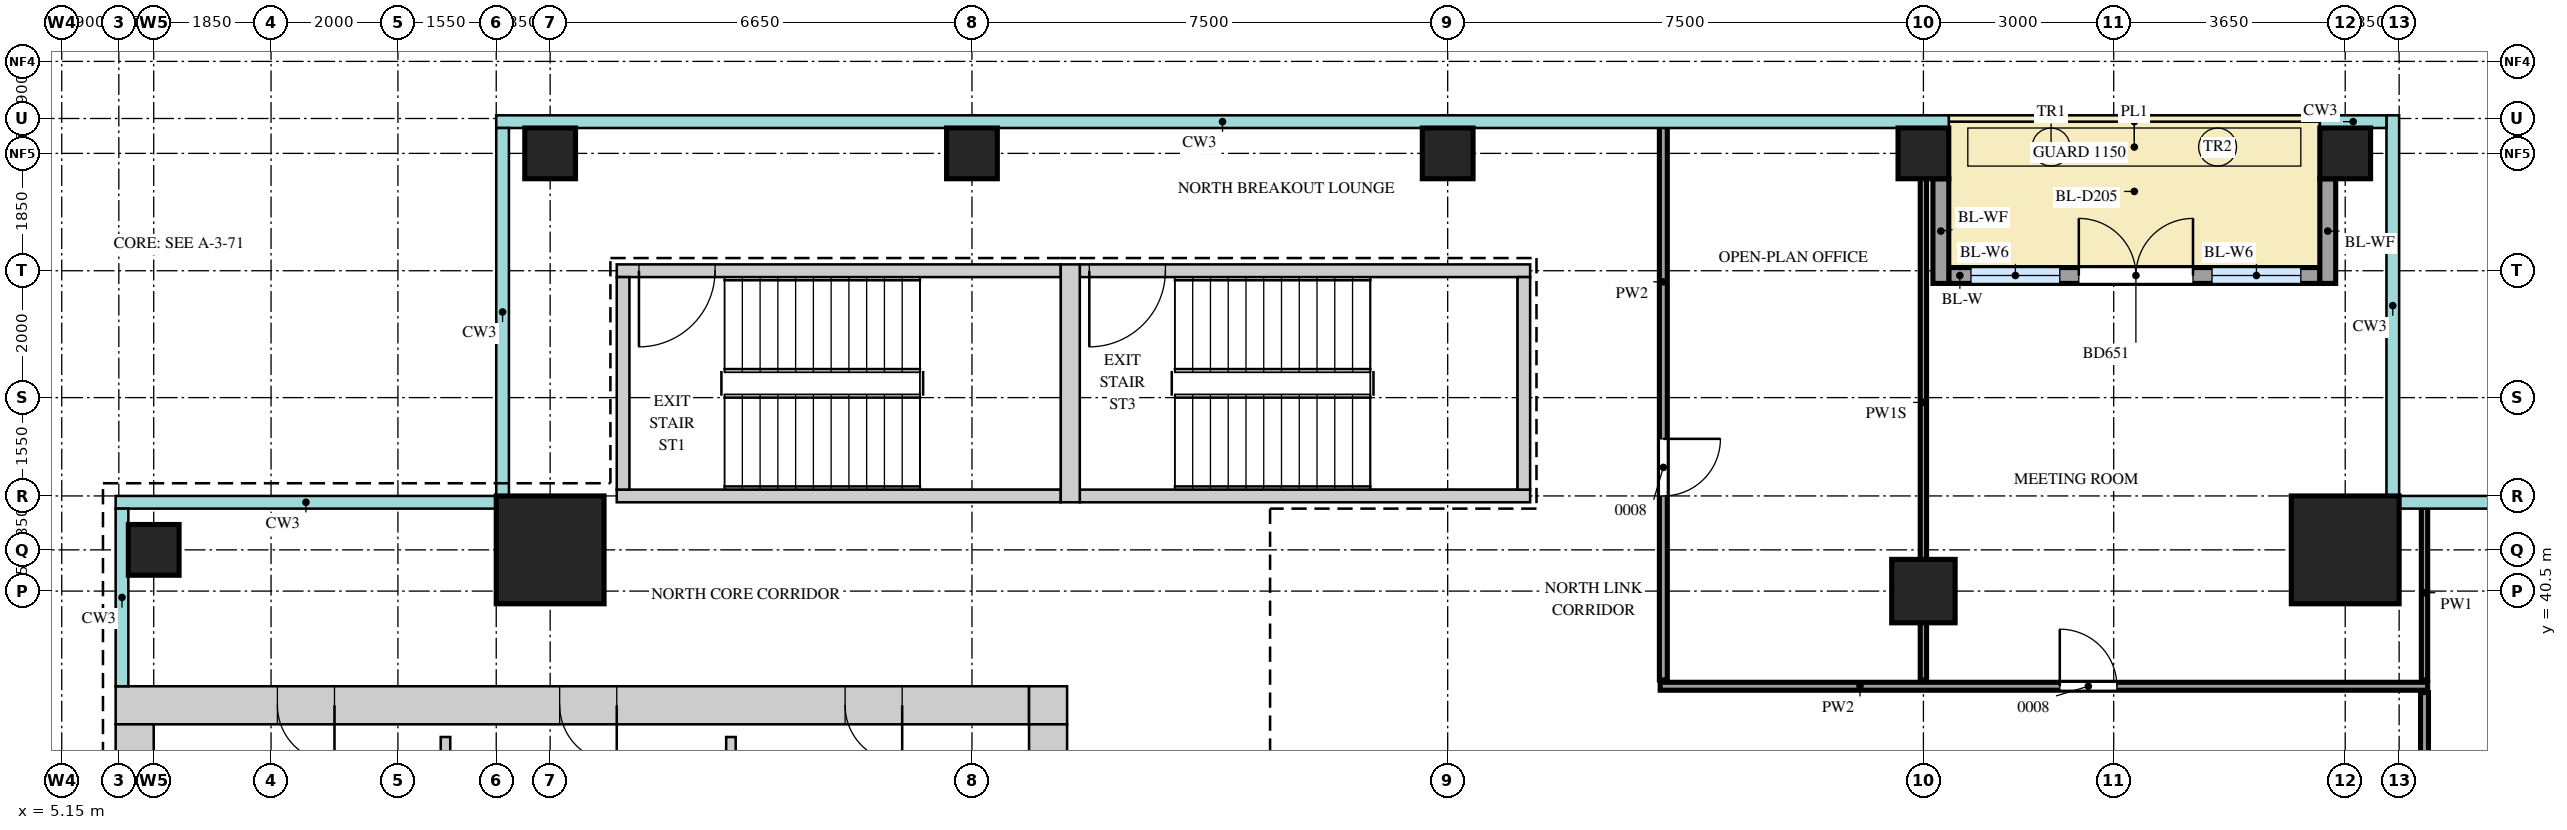
"""IFC4 building model, lengths in metres.
Left out: names, types, materials, properties, quantities, classifications, styles, units other than length and angle.
Written with IfcOpenShell. Run it as: python <this file> out.ifc"""

import sys

from ifc_helpers import new_model, si_unit, direction, frame, frame_2d, origin, origin_2d, place, context, subcontext, project, spatial, rectangle, extrude, source, transform, mapped, element, fill, save


model = new_model("IFC4")
c1 = context("Model", 3, precision=1e-05, world=origin(), true_north=direction((0.0, 1.0)))
c2 = subcontext(c1, "Body", "Model", "MODEL_VIEW")
j1 = project(units=[si_unit("LENGTHUNIT", "METRE"), si_unit("PLANEANGLEUNIT", "RADIAN")], contexts=[c1])
p1 = place(None, origin())
s1 = spatial("IfcSite", under=j1, at=p1, CompositionType="ELEMENT")
p2 = place(p1, origin())
s2 = spatial("IfcBuilding", under=s1, at=p2, CompositionType="ELEMENT")
p3 = place(p2, frame((0.0, 0.0, 290.2)))
s3 = spatial("IfcBuildingStorey", under=s2, at=p3, CompositionType="ELEMENT", Elevation=290.2)
m1 = source(origin(), c2, "Body", "SweptSolid", [
    extrude(rectangle(XDim=14.4, YDim=0.6, at=frame_2d((7.2, 0.0))), origin(), (0.0, 0.0, 1.0), 3.75),
])
p4 = place(p3, frame((6.0, 38.7, 0.0), z_axis=(0.0, 0.0, 1.0), x_axis=(1.0, 0.0, 0.0)))
e1 = element("IfcWall", 1, at=p4, inside=s3, PredefinedType="SHEAR", context=c2, shape_type="MappedRepresentation", body=[
    mapped(m1, transform((0.0, 0.0, 0.0))),
])
m2 = source(origin(), c2, "Body", "SweptSolid", [
    extrude(rectangle(XDim=0.9, YDim=2.1, at=frame_2d((0.45, 1.05))), frame((0.0, 0.31, 0.0), z_axis=(0.0, -1.0, 0.0), x_axis=(1.0, 0.0, 0.0)), (0.0, 0.0, 1.0), 0.62),
])
p5 = place(p4, frame((2.55, 0.0, 0.0)))
e2 = element("IfcOpeningElement", 2, at=p5, cuts=e1, PredefinedType="OPENING", context=c2, shape_type="MappedRepresentation", body=[
    mapped(m2, transform((0.0, 0.0, 0.0))),
])
p6 = place(p4, frame((7.0, 0.0, 0.0)))
e3 = element("IfcOpeningElement", 3, at=p6, cuts=e1, PredefinedType="OPENING", context=c2, shape_type="MappedRepresentation", body=[
    mapped(m2, transform((0.0, 0.0, 0.0))),
])
p7 = place(p4, frame((11.5, 0.0, 0.0)))
e4 = element("IfcOpeningElement", 4, at=p7, cuts=e1, PredefinedType="OPENING", context=c2, shape_type="MappedRepresentation", body=[
    mapped(m2, transform((0.0, 0.0, 0.0))),
])
m3 = source(origin(), c2, "Body", "SweptSolid", [
    extrude(rectangle(XDim=0.6, YDim=0.6, at=frame_2d((0.3, 0.0))), origin(), (0.0, 0.0, 1.0), 3.75),
])
p8 = place(p3, frame((20.4, 38.7, 0.0), z_axis=(0.0, 0.0, 1.0), x_axis=(1.0, 0.0, 0.0)))
e5 = element("IfcWall", 5, at=p8, inside=s3, PredefinedType="SHEAR", context=c2, shape_type="MappedRepresentation", body=[
    mapped(m3, transform((0.0, 0.0, 0.0))),
])
m4 = source(origin(), c2, "Body", "SweptSolid", [
    extrude(rectangle(XDim=22.8, YDim=0.6, at=frame_2d((11.4, 0.0))), origin(), (0.0, 0.0, 1.0), 3.75),
])
p9 = place(p3, frame((20.7, 15.6, 0.0), z_axis=(0.0, 0.0, 1.0), x_axis=(0.0, 1.0, 0.0)))
e6 = element("IfcWall", 6, at=p9, inside=s3, PredefinedType="SHEAR", context=c2, shape_type="MappedRepresentation", body=[
    mapped(m4, transform((0.0, 0.0, 0.0))),
])
m5 = source(origin(), c2, "Body", "SweptSolid", [
    extrude(rectangle(XDim=1.8, YDim=2.1, at=frame_2d((0.9, 1.05))), frame((0.0, 0.31, 0.0), z_axis=(0.0, -1.0, 0.0), x_axis=(1.0, 0.0, 0.0)), (0.0, 0.0, 1.0), 0.62),
])
p10 = place(p9, frame((10.9, 0.0, 0.0)))
e7 = element("IfcOpeningElement", 7, at=p10, cuts=e6, PredefinedType="OPENING", context=c2, shape_type="MappedRepresentation", body=[
    mapped(m5, transform((0.0, 0.0, 0.0))),
])
p11 = place(p9, frame((0.55, 0.0, 0.0)))
e8 = element("IfcOpeningElement", 8, at=p11, cuts=e6, PredefinedType="OPENING", context=c2, shape_type="MappedRepresentation", body=[
    mapped(m2, transform((0.0, 0.0, 0.0))),
])
m6 = source(origin(), c2, "Body", "SweptSolid", [
    extrude(rectangle(XDim=1.0, YDim=2.1, at=frame_2d((0.5, 1.05))), frame((0.0, 0.31, 0.0), z_axis=(0.0, -1.0, 0.0), x_axis=(1.0, 0.0, 0.0)), (0.0, 0.0, 1.0), 0.62),
])
p12 = place(p9, frame((2.3, 0.0, 0.0)))
e9 = element("IfcOpeningElement", 9, at=p12, cuts=e6, PredefinedType="OPENING", context=c2, shape_type="MappedRepresentation", body=[
    mapped(m6, transform((0.0, 0.0, 0.0))),
])
p13 = place(p9, frame((5.1, 0.0, 0.0)))
e10 = element("IfcOpeningElement", 10, at=p13, cuts=e6, PredefinedType="OPENING", context=c2, shape_type="MappedRepresentation", body=[
    mapped(m2, transform((0.0, 0.0, 0.0))),
])
p14 = place(p3, frame((6.3, 15.6, 0.0), z_axis=(0.0, 0.0, 1.0), x_axis=(0.0, 1.0, 0.0)))
e11 = element("IfcWall", 11, at=p14, inside=s3, PredefinedType="SHEAR", context=c2, shape_type="MappedRepresentation", body=[
    mapped(m4, transform((0.0, 0.0, 0.0))),
])
m7 = source(origin(), c2, "Body", "SweptSolid", [
    extrude(rectangle(XDim=7.0, YDim=0.2, at=frame_2d((3.5, 0.0))), origin(), (0.0, 0.0, 1.0), 3.75),
])
p15 = place(p3, frame((13.9, 45.55, 0.0), z_axis=(0.0, 0.0, 1.0), x_axis=(1.0, 0.0, 0.0)))
e12 = element("IfcWall", 12, at=p15, inside=s3, PredefinedType="SHEAR", context=c2, shape_type="MappedRepresentation", body=[
    mapped(m7, transform((0.0, 0.0, 0.0))),
])
m8 = source(origin(), c2, "Body", "SweptSolid", [
    extrude(rectangle(XDim=1.2, YDim=2.1, at=frame_2d((0.6, 1.05))), frame((0.0, 0.11, 0.0), z_axis=(0.0, -1.0, 0.0), x_axis=(1.0, 0.0, 0.0)), (0.0, 0.0, 1.0), 0.22),
])
p16 = place(p15, frame((0.35, 0.0, 0.0)))
e13 = element("IfcOpeningElement", 13, at=p16, cuts=e12, PredefinedType="OPENING", context=c2, shape_type="MappedRepresentation", body=[
    mapped(m8, transform((0.0, 0.0, 0.0))),
])
p17 = place(p3, frame((13.9, 42.0, 0.0), z_axis=(0.0, 0.0, 1.0), x_axis=(1.0, 0.0, 0.0)))
e14 = element("IfcWall", 14, at=p17, inside=s3, PredefinedType="SHEAR", context=c2, shape_type="MappedRepresentation", body=[
    mapped(m7, transform((0.0, 0.0, 0.0))),
])
m9 = source(origin(), c2, "Body", "SweptSolid", [
    extrude(rectangle(XDim=7.1, YDim=0.2, at=frame_2d((3.55, 0.0))), origin(), (0.0, 0.0, 1.0), 3.75),
])
p18 = place(p3, frame((21.2, 45.55, 0.0), z_axis=(0.0, 0.0, 1.0), x_axis=(1.0, 0.0, 0.0)))
e15 = element("IfcWall", 15, at=p18, inside=s3, PredefinedType="SHEAR", context=c2, shape_type="MappedRepresentation", body=[
    mapped(m9, transform((0.0, 0.0, 0.0))),
])
p19 = place(p18, frame((0.15, 0.0, 0.0)))
e16 = element("IfcOpeningElement", 16, at=p19, cuts=e15, PredefinedType="OPENING", context=c2, shape_type="MappedRepresentation", body=[
    mapped(m8, transform((0.0, 0.0, 0.0))),
])
p20 = place(p3, frame((21.2, 42.0, 0.0), z_axis=(0.0, 0.0, 1.0), x_axis=(1.0, 0.0, 0.0)))
e17 = element("IfcWall", 17, at=p20, inside=s3, PredefinedType="SHEAR", context=c2, shape_type="MappedRepresentation", body=[
    mapped(m9, transform((0.0, 0.0, 0.0))),
])
m10 = source(origin(), c2, "Body", "SweptSolid", [
    extrude(rectangle(XDim=3.75, YDim=0.3, at=frame_2d((1.875, 0.0))), origin(), (0.0, 0.0, 1.0), 3.75),
])
p21 = place(p3, frame((21.05, 41.9, 0.0), z_axis=(0.0, 0.0, 1.0), x_axis=(0.0, 1.0, 0.0)))
e18 = element("IfcWall", 18, at=p21, inside=s3, PredefinedType="SHEAR", context=c2, shape_type="MappedRepresentation", body=[
    mapped(m10, transform((0.0, 0.0, 0.0))),
])
m11 = source(origin(), c2, "Body", "SweptSolid", [
    extrude(rectangle(XDim=3.35, YDim=0.2, at=frame_2d((1.675, 0.0))), origin(), (0.0, 0.0, 1.0), 3.75),
])
for number, where, z_axis, x_axis in (
    (19, (14.0, 42.1, 0.0), (0.0, 0.0, 1.0), (0.0, 1.0, 0.0)),
    (20, (28.2, 42.1, 0.0), (0.0, 0.0, 1.0), (0.0, 1.0, 0.0)),
):
    element("IfcWall", number, at=place(p3, frame(where, z_axis=z_axis, x_axis=x_axis)), inside=s3, PredefinedType="SHEAR", context=c2, shape_type="MappedRepresentation", body=[
        mapped(m11, transform((0.0, 0.0, 0.0))),
    ])
m12 = source(origin(), c2, "Body", "SweptSolid", [
    extrude(rectangle(XDim=1.7, YDim=1.7, at=origin_2d()), origin(), (0.0, 0.0, 1.0), 3.75),
])
for number, where, z_axis, x_axis in (
    (21, (41.15, 41.15, 0.0), (0.0, 0.0, 1.0), (1.0, 0.0, 0.0)),
    (22, (12.85, 41.15, 0.0), (0.0, 0.0, 1.0), (1.0, 0.0, 0.0)),
):
    element("IfcColumn", number, at=place(p3, frame(where, z_axis=z_axis, x_axis=x_axis)), inside=s3, PredefinedType="COLUMN", context=c2, shape_type="MappedRepresentation", body=[
        mapped(m12, transform((0.0, 0.0, 0.0))),
    ])
m13 = source(origin(), c2, "Body", "SweptSolid", [
    extrude(rectangle(XDim=0.8, YDim=0.8, at=origin_2d()), origin(), (0.0, 0.0, 1.0), 3.75),
])
for number, where, z_axis, x_axis in (
    (23, (12.85, 47.4, 0.0), (0.0, 0.0, 1.0), (1.0, 0.0, 0.0)),
    (24, (19.5, 47.4, 0.0), (0.0, 0.0, 1.0), (1.0, 0.0, 0.0)),
    (25, (27.0, 47.4, 0.0), (0.0, 0.0, 1.0), (1.0, 0.0, 0.0)),
    (26, (34.5, 47.4, 0.0), (0.0, 0.0, 1.0), (1.0, 0.0, 0.0)),
    (27, (41.15, 47.4, 0.0), (0.0, 0.0, 1.0), (1.0, 0.0, 0.0)),
    (28, (6.6, 41.15, 0.0), (0.0, 0.0, 1.0), (1.0, 0.0, 0.0)),
):
    element("IfcColumn", number, at=place(p3, frame(where, z_axis=z_axis, x_axis=x_axis)), inside=s3, PredefinedType="COLUMN", context=c2, shape_type="MappedRepresentation", body=[
        mapped(m13, transform((0.0, 0.0, 0.0))),
    ])
m14 = source(origin(), c2, "Body", "SweptSolid", [
    extrude(rectangle(XDim=1.0, YDim=1.0, at=origin_2d()), origin(), (0.0, 0.0, 1.0), 3.75),
])
p22 = place(p3, frame((34.5, 40.5, 0.0), z_axis=(0.0, 0.0, 1.0), x_axis=(1.0, 0.0, 0.0)))
e29 = element("IfcColumn", 29, at=p22, inside=s3, PredefinedType="COLUMN", context=c2, shape_type="MappedRepresentation", body=[
    mapped(m14, transform((0.0, 0.0, 0.0))),
])
m15 = source(origin(), c2, "Body", "SweptSolid", [
    extrude(rectangle(XDim=5.85, YDim=0.25, at=frame_2d((2.925, 0.0))), origin(), (0.0, 0.0, 1.0), 3.75),
])
p23 = place(p3, frame((34.9, 45.475, 0.0), z_axis=(0.0, 0.0, 1.0), x_axis=(1.0, 0.0, 0.0)))
e30 = element("IfcWall", 30, at=p23, inside=s3, PredefinedType="SOLIDWALL", context=c2, shape_type="MappedRepresentation", body=[
    mapped(m15, transform((0.0, 0.0, 0.0))),
])
m16 = source(origin(), c2, "Body", "SweptSolid", [
    extrude(rectangle(XDim=1.4, YDim=2.4, at=frame_2d((0.7, 1.2))), frame((0.0, 0.135, 0.0), z_axis=(0.0, -1.0, 0.0), x_axis=(1.0, 0.0, 0.0)), (0.0, 0.0, 1.0), 0.27),
])
p24 = place(p23, frame((0.35, 0.0, 0.0)))
e31 = element("IfcOpeningElement", 31, at=p24, cuts=e30, PredefinedType="OPENING", context=c2, shape_type="MappedRepresentation", body=[
    mapped(m16, transform((0.0, 0.0, 0.0))),
])
p25 = place(p23, frame((4.15, 0.0, 0.0)))
e32 = element("IfcOpeningElement", 32, at=p25, cuts=e30, PredefinedType="OPENING", context=c2, shape_type="MappedRepresentation", body=[
    mapped(m16, transform((0.0, 0.0, 0.0))),
])
m17 = source(origin(), c2, "Body", "SweptSolid", [
    extrude(rectangle(XDim=1.8, YDim=2.4, at=frame_2d((0.9, 1.2))), frame((0.0, 0.135, 0.0), z_axis=(0.0, -1.0, 0.0), x_axis=(1.0, 0.0, 0.0)), (0.0, 0.0, 1.0), 0.27),
])
p26 = place(p23, frame((2.05, 0.0, 0.0)))
e33 = element("IfcOpeningElement", 33, at=p26, cuts=e30, PredefinedType="OPENING", context=c2, shape_type="MappedRepresentation", body=[
    mapped(m17, transform((0.0, 0.0, 0.0))),
])
m18 = source(origin(), c2, "Body", "SweptSolid", [
    extrude(rectangle(XDim=1.65, YDim=0.25, at=frame_2d((0.825, 0.0))), origin(), (0.0, 0.0, 1.0), 3.45),
])
for number, where, z_axis, x_axis in (
    (34, (34.775, 47.0, 0.0), (0.0, 0.0, 1.0), (0.0, -1.0, 0.0)),
    (35, (40.875, 47.0, 0.0), (0.0, 0.0, 1.0), (0.0, -1.0, 0.0)),
):
    element("IfcWall", number, at=place(p3, frame(where, z_axis=z_axis, x_axis=x_axis)), inside=s3, PredefinedType="SOLIDWALL", context=c2, shape_type="MappedRepresentation", body=[
        mapped(m18, transform((0.0, 0.0, 0.0))),
    ])
m19 = source(origin(), c2, "Body", "SweptSolid", [
    extrude(rectangle(XDim=23.8, YDim=0.125, at=frame_2d((11.9, 0.0))), origin(), (0.0, 0.0, 1.0), 3.8),
])
p27 = place(p3, frame((42.4, 15.1, 0.0), z_axis=(0.0, 0.0, 1.0), x_axis=(0.0, 1.0, 0.0)))
e36 = element("IfcWall", 36, at=p27, inside=s3, PredefinedType="PARTITIONING", context=c2, shape_type="MappedRepresentation", body=[
    mapped(m19, transform((0.0, 0.0, 0.0))),
])
m20 = source(origin(), c2, "Body", "SweptSolid", [
    extrude(rectangle(XDim=0.9, YDim=2.1, at=frame_2d((0.45, 1.05))), frame((0.0, 0.073, 0.0), z_axis=(0.0, -1.0, 0.0), x_axis=(1.0, 0.0, 0.0)), (0.0, 0.0, 1.0), 0.145),
])
p28 = place(p27, frame((5.3, 0.0, 0.0)))
e37 = element("IfcOpeningElement", 37, at=p28, cuts=e36, PredefinedType="OPENING", context=c2, shape_type="MappedRepresentation", body=[
    mapped(m20, transform((0.0, 0.0, 0.0))),
])
p29 = place(p27, frame((15.35, 0.0, 0.0)))
e38 = element("IfcOpeningElement", 38, at=p29, cuts=e36, PredefinedType="OPENING", context=c2, shape_type="MappedRepresentation", body=[
    mapped(m20, transform((0.0, 0.0, 0.0))),
])
p30 = place(p27, frame((21.05, 0.0, 0.0)))
e39 = element("IfcOpeningElement", 39, at=p30, cuts=e36, PredefinedType="OPENING", context=c2, shape_type="MappedRepresentation", body=[
    mapped(m20, transform((0.0, 0.0, 0.0))),
])
m21 = source(origin(), c2, "Body", "SweptSolid", [
    extrude(rectangle(XDim=6.0, YDim=0.15, at=frame_2d((3.0, 0.0))), origin(), (0.0, 0.0, 1.0), 3.8),
])
p31 = place(p3, frame((11.2, 32.2, 0.0), z_axis=(0.0, 0.0, 1.0), x_axis=(0.0, 1.0, 0.0)))
e40 = element("IfcWall", 40, at=p31, inside=s3, PredefinedType="PARTITIONING", context=c2, shape_type="MappedRepresentation", body=[
    mapped(m21, transform((0.0, 0.0, 0.0))),
])
m22 = source(origin(), c2, "Body", "SweptSolid", [
    extrude(rectangle(XDim=5.9, YDim=0.15, at=frame_2d((2.95, 0.0))), origin(), (0.0, 0.0, 1.0), 3.8),
])
p32 = place(p3, frame((15.7, 32.3, 0.0), z_axis=(0.0, 0.0, 1.0), x_axis=(0.0, 1.0, 0.0)))
e41 = element("IfcWall", 41, at=p32, inside=s3, PredefinedType="PARTITIONING", context=c2, shape_type="MappedRepresentation", body=[
    mapped(m22, transform((0.0, 0.0, 0.0))),
])
m23 = source(origin(), c2, "Body", "SweptSolid", [
    extrude(rectangle(XDim=12.1, YDim=0.125, at=frame_2d((6.05, 0.0))), origin(), (0.0, 0.0, 1.0), 3.8),
])
p33 = place(p3, frame((30.35, 39.0, 0.0), z_axis=(0.0, 0.0, 1.0), x_axis=(1.0, 0.0, 0.0)))
e42 = element("IfcWall", 42, at=p33, inside=s3, PredefinedType="PARTITIONING", context=c2, shape_type="MappedRepresentation", body=[
    mapped(m23, transform((0.0, 0.0, 0.0))),
])
p34 = place(p33, frame((6.3, 0.0, 0.0)))
e43 = element("IfcOpeningElement", 43, at=p34, cuts=e42, PredefinedType="OPENING", context=c2, shape_type="MappedRepresentation", body=[
    mapped(m20, transform((0.0, 0.0, 0.0))),
])
m24 = source(origin(), c2, "Body", "SweptSolid", [
    extrude(rectangle(XDim=8.75, YDim=0.125, at=frame_2d((4.375, 0.0))), origin(), (0.0, 0.0, 1.0), 3.8),
])
p35 = place(p3, frame((30.4, 39.1, 0.0), z_axis=(0.0, 0.0, 1.0), x_axis=(0.0, 1.0, 0.0)))
e44 = element("IfcWall", 44, at=p35, inside=s3, PredefinedType="PARTITIONING", context=c2, shape_type="MappedRepresentation", body=[
    mapped(m24, transform((0.0, 0.0, 0.0))),
])
p36 = place(p35, frame((2.9, 0.0, 0.0)))
e45 = element("IfcOpeningElement", 45, at=p36, cuts=e44, PredefinedType="OPENING", context=c2, shape_type="MappedRepresentation", body=[
    mapped(m20, transform((0.0, 0.0, 0.0))),
])
m25 = source(origin(), c2, "Body", "SweptSolid", [
    extrude(rectangle(XDim=8.75, YDim=0.1, at=frame_2d((4.375, 0.0))), origin(), (0.0, 0.0, 1.0), 3.35),
])
p37 = place(p3, frame((34.5, 39.1, 0.0), z_axis=(0.0, 0.0, 1.0), x_axis=(0.0, 1.0, 0.0)))
e46 = element("IfcWall", 46, at=p37, inside=s3, PredefinedType="PARTITIONING", context=c2, shape_type="MappedRepresentation", body=[
    mapped(m25, transform((0.0, 0.0, 0.0))),
])
m26 = source(origin(), c2, "Body", "SweptSolid", [
    extrude(rectangle(XDim=2.75, YDim=0.1, at=frame_2d((1.375, 0.0))), origin(), (0.0, 0.0, 1.0), 3.8),
])
p38 = place(p3, frame((42.4, 39.1, 0.0), z_axis=(0.0, 0.0, 1.0), x_axis=(0.0, 1.0, 0.0)))
e47 = element("IfcWall", 47, at=p38, inside=s3, PredefinedType="PARTITIONING", context=c2, shape_type="MappedRepresentation", body=[
    mapped(m26, transform((0.0, 0.0, 0.0))),
])
m27 = source(origin(), c2, "Body", "SweptSolid", [
    extrude(rectangle(XDim=1.4, YDim=2.4, at=frame_2d((0.7, 1.2))), frame((0.0, 0.03, 0.0), z_axis=(0.0, -1.0, 0.0), x_axis=(1.0, 0.0, 0.0)), (0.0, 0.0, 1.0), 0.06),
])
p39 = place(p24, origin())
e48 = element("IfcWindow", 48, at=p39, inside=s3, PartitioningType="SINGLE_PANEL", PredefinedType="WINDOW", context=c2, shape_type="MappedRepresentation", body=[
    mapped(m27, transform((0.0, 0.0, 0.0))),
])
fill(e31, e48)
p40 = place(p25, origin())
e49 = element("IfcWindow", 49, at=p40, inside=s3, PartitioningType="SINGLE_PANEL", PredefinedType="WINDOW", context=c2, shape_type="MappedRepresentation", body=[
    mapped(m27, transform((0.0, 0.0, 0.0))),
])
fill(e32, e49)
m28 = source(origin(), c2, "Body", "SweptSolid", [
    extrude(rectangle(XDim=1.8, YDim=2.4, at=frame_2d((0.9, 1.2))), frame((0.0, 0.025, 0.0), z_axis=(0.0, -1.0, 0.0), x_axis=(1.0, 0.0, 0.0)), (0.0, 0.0, 1.0), 0.05),
])
p41 = place(p26, origin())
e50 = element("IfcDoor", 50, at=p41, inside=s3, OperationType="DOUBLE_DOOR_DOUBLE_SWING", PredefinedType="DOOR", context=c2, shape_type="MappedRepresentation", body=[
    mapped(m28, transform((0.0, 0.0, 0.0))),
])
fill(e33, e50)
m29 = source(origin(), c2, "Body", "SweptSolid", [
    extrude(rectangle(XDim=0.9, YDim=2.1, at=frame_2d((0.45, 1.05))), frame((0.0, 0.25, 0.0), z_axis=(0.0, -1.0, 0.0), x_axis=(1.0, 0.0, 0.0)), (0.0, 0.0, 1.0), 0.5),
])
p42 = place(p5, origin())
e51 = element("IfcDoor", 51, at=p42, inside=s3, OperationType="SINGLE_SWING_RIGHT", PredefinedType="DOOR", context=c2, shape_type="MappedRepresentation", body=[
    mapped(m29, transform((0.0, 0.0, 0.0))),
])
fill(e2, e51)
p43 = place(p6, origin())
e52 = element("IfcDoor", 52, at=p43, inside=s3, OperationType="SINGLE_SWING_RIGHT", PredefinedType="DOOR", context=c2, shape_type="MappedRepresentation", body=[
    mapped(m29, transform((0.0, 0.0, 0.0))),
])
fill(e3, e52)
p44 = place(p7, origin())
e53 = element("IfcDoor", 53, at=p44, inside=s3, OperationType="SINGLE_SWING_RIGHT", PredefinedType="DOOR", context=c2, shape_type="MappedRepresentation", body=[
    mapped(m29, transform((0.0, 0.0, 0.0))),
])
fill(e4, e53)
m30 = source(origin(), c2, "Body", "SweptSolid", [
    extrude(rectangle(XDim=0.9, YDim=2.1, at=frame_2d((0.45, 1.05))), frame((0.0, 0.025, 0.0), z_axis=(0.0, -1.0, 0.0), x_axis=(1.0, 0.0, 0.0)), (0.0, 0.0, 1.0), 0.05),
])
p45 = place(p36, origin())
e54 = element("IfcDoor", 54, at=p45, inside=s3, OperationType="SINGLE_SWING_RIGHT", PredefinedType="DOOR", context=c2, shape_type="MappedRepresentation", body=[
    mapped(m30, transform((0.0, 0.0, 0.0))),
])
fill(e45, e54)
p46 = place(p34, origin())
e55 = element("IfcDoor", 55, at=p46, inside=s3, OperationType="SINGLE_SWING_RIGHT", PredefinedType="DOOR", context=c2, shape_type="MappedRepresentation", body=[
    mapped(m30, transform((0.0, 0.0, 0.0))),
])
fill(e43, e55)
m31 = source(origin(), c2, "Body", "SweptSolid", [
    extrude(rectangle(XDim=1.2, YDim=2.1, at=frame_2d((0.6, 1.05))), frame((0.0, 0.025, 0.0), z_axis=(0.0, -1.0, 0.0), x_axis=(1.0, 0.0, 0.0)), (0.0, 0.0, 1.0), 0.05),
])
p47 = place(p16, origin())
e56 = element("IfcDoor", 56, at=p47, inside=s3, OperationType="SINGLE_SWING_LEFT", PredefinedType="DOOR", context=c2, shape_type="MappedRepresentation", body=[
    mapped(m31, transform((0.0, 0.0, 0.0))),
])
fill(e13, e56)
p48 = place(p19, origin())
e57 = element("IfcDoor", 57, at=p48, inside=s3, OperationType="SINGLE_SWING_LEFT", PredefinedType="DOOR", context=c2, shape_type="MappedRepresentation", body=[
    mapped(m31, transform((0.0, 0.0, 0.0))),
])
fill(e16, e57)
save(model, sys.argv[1])
